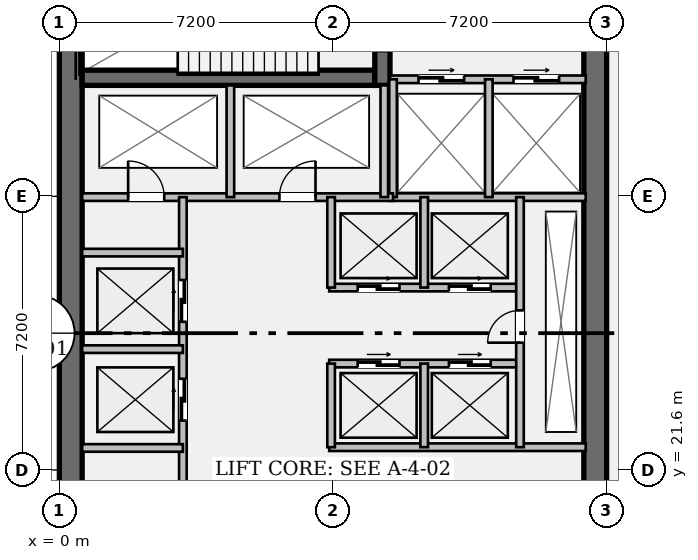
"""IFC4 building model, lengths in metres.
Left out: names, types, materials, properties, quantities, classifications, styles, units other than length and angle.
Written with IfcOpenShell. Run it as: python <this file> out.ifc"""

import sys

from ifc_helpers import new_model, si_unit, direction, frame, frame_2d, origin, place, context, subcontext, project, spatial, rectangle, extrude, element, fill, save


model = new_model("IFC4")
c1 = context("Model", 3, precision=1e-05, world=origin(), true_north=direction((0.0, 1.0)))
c2 = subcontext(c1, "Body", "Model", "MODEL_VIEW")
j1 = project(units=[si_unit("LENGTHUNIT", "METRE"), si_unit("PLANEANGLEUNIT", "RADIAN")], contexts=[c1])
p1 = place(None, origin())
s1 = spatial("IfcSite", under=j1, at=p1, CompositionType="ELEMENT")
p2 = place(p1, origin())
s2 = spatial("IfcBuilding", under=s1, at=p2, CompositionType="ELEMENT")
p3 = place(p2, origin())
s3 = spatial("IfcBuildingStorey", under=s2, at=p3, CompositionType="ELEMENT", Elevation=0.0)
p4 = place(p3, frame((0.3, 7.2, 0.0), z_axis=(0.0, 0.0, 1.0), x_axis=(0.0, 1.0, 0.0)))
e1 = element("IfcWall", 1, at=p4, inside=s3, PredefinedType="SHEAR", context=c2, shape_type="SweptSolid", body=[
    extrude(rectangle(XDim=28.8, YDim=0.6, at=frame_2d((14.4, 0.0))), origin(), (0.0, 0.0, 1.0), 4.95),
])
p5 = place(p3, frame((14.1, 35.4, 0.0), z_axis=(0.0, 0.0, 1.0), x_axis=(0.0, -1.0, 0.0)))
e2 = element("IfcWall", 2, at=p5, inside=s3, PredefinedType="SHEAR", context=c2, shape_type="SweptSolid", body=[
    extrude(rectangle(XDim=27.6, YDim=0.6, at=frame_2d((13.8, 0.0))), origin(), (0.0, 0.0, 1.0), 4.95),
])
p6 = place(p5, frame((1.3, 0.0, 0.0)))
e3 = element("IfcOpeningElement", 3, at=p6, cuts=e2, PredefinedType="OPENING", context=c2, shape_type="SweptSolid", body=[
    extrude(rectangle(XDim=1.2, YDim=2.15, at=frame_2d((0.6, 1.075))), frame((0.0, 0.312, 0.0), z_axis=(0.0, -1.0, 0.0), x_axis=(1.0, 0.0, 0.0)), (0.0, 0.0, 1.0), 0.624),
])
p7 = place(p5, frame((25.25, 0.0, 0.0)))
e4 = element("IfcOpeningElement", 4, at=p7, cuts=e2, PredefinedType="OPENING", context=c2, shape_type="SweptSolid", body=[
    extrude(rectangle(XDim=1.2, YDim=2.15, at=frame_2d((0.6, 1.075))), frame((0.0, 0.312, 0.0), z_axis=(0.0, -1.0, 0.0), x_axis=(1.0, 0.0, 0.0)), (0.0, 0.0, 1.0), 0.624),
])
p8 = place(p5, frame((14.6, 0.0, 0.0)))
e5 = element("IfcOpeningElement", 5, at=p8, cuts=e2, PredefinedType="OPENING", context=c2, shape_type="SweptSolid", body=[
    extrude(rectangle(XDim=1.6, YDim=2.2, at=frame_2d((0.8, 1.1))), frame((0.0, 0.312, 0.0), z_axis=(0.0, -1.0, 0.0), x_axis=(1.0, 0.0, 0.0)), (0.0, 0.0, 1.0), 0.624),
])
p9 = place(p3, frame((0.6, 31.92, 0.0), z_axis=(0.0, 0.0, 1.0), x_axis=(1.0, 0.0, 0.0)))
e6 = element("IfcWall", 6, at=p9, inside=s3, PredefinedType="SHEAR", context=c2, shape_type="SweptSolid", body=[
    extrude(rectangle(XDim=7.7, YDim=0.4, at=frame_2d((3.85, 0.0))), origin(), (0.0, 0.0, 1.0), 4.95),
])
p10 = place(p3, frame((8.5, 31.72, 0.0), z_axis=(0.0, 0.0, 1.0), x_axis=(0.0, 1.0, 0.0)))
e7 = element("IfcWall", 7, at=p10, inside=s3, PredefinedType="SHEAR", context=c2, shape_type="SweptSolid", body=[
    extrude(rectangle(XDim=3.68, YDim=0.4, at=frame_2d((1.84, 0.0))), origin(), (0.0, 0.0, 1.0), 4.95),
])
p11 = place(p10, frame((0.9, 0.0, 0.0)))
e8 = element("IfcOpeningElement", 8, at=p11, cuts=e7, PredefinedType="OPENING", context=c2, shape_type="SweptSolid", body=[
    extrude(rectangle(XDim=1.1, YDim=2.15, at=frame_2d((0.55, 1.075))), frame((0.0, 0.212, 0.0), z_axis=(0.0, -1.0, 0.0), x_axis=(1.0, 0.0, 0.0)), (0.0, 0.0, 1.0), 0.424),
])
p12 = place(p3, frame((8.7, 31.88, 0.0), z_axis=(0.0, 0.0, 1.0), x_axis=(1.0, 0.0, 0.0)))
e9 = element("IfcWall", 9, at=p12, inside=s3, PredefinedType="PARTITIONING", context=c2, shape_type="SweptSolid", body=[
    extrude(rectangle(XDim=5.15, YDim=0.2, at=frame_2d((2.575, 0.0))), origin(), (0.0, 0.0, 1.0), 4.95),
])
p13 = place(p12, frame((0.75, 0.0, 0.0)))
e10 = element("IfcOpeningElement", 10, at=p13, cuts=e9, PredefinedType="OPENING", context=c2, shape_type="SweptSolid", body=[
    extrude(rectangle(XDim=1.2, YDim=2.2, at=frame_2d((0.6, 1.1))), frame((0.0, 0.112, 0.0), z_axis=(0.0, -1.0, 0.0), x_axis=(1.0, 0.0, 0.0)), (0.0, 0.0, 1.0), 0.224),
])
p14 = place(p12, frame((3.25, 0.0, 0.0)))
e11 = element("IfcOpeningElement", 11, at=p14, cuts=e9, PredefinedType="OPENING", context=c2, shape_type="SweptSolid", body=[
    extrude(rectangle(XDim=1.2, YDim=2.2, at=frame_2d((0.6, 1.1))), frame((0.0, 0.112, 0.0), z_axis=(0.0, -1.0, 0.0), x_axis=(1.0, 0.0, 0.0)), (0.0, 0.0, 1.0), 0.224),
])
p15 = place(p3, frame((8.7, 28.78, 0.0), z_axis=(0.0, 0.0, 1.0), x_axis=(1.0, 0.0, 0.0)))
e12 = element("IfcWall", 12, at=p15, inside=s3, PredefinedType="PARTITIONING", context=c2, shape_type="SweptSolid", body=[
    extrude(rectangle(XDim=5.15, YDim=0.2, at=frame_2d((2.575, 0.0))), origin(), (0.0, 0.0, 1.0), 4.95),
])
for number, where, z_axis, x_axis in (
    (13, (8.78, 28.78, 0.0), (0.0, 0.0, 1.0), (0.0, 1.0, 0.0)),
    (14, (11.3, 28.78, 0.0), (0.0, 0.0, 1.0), (0.0, 1.0, 0.0)),
):
    element("IfcWall", number, at=place(p3, frame(where, z_axis=z_axis, x_axis=x_axis)), inside=s3, PredefinedType="PARTITIONING", context=c2, shape_type="SweptSolid", body=[
        extrude(rectangle(XDim=3.1, YDim=0.2, at=frame_2d((1.55, 0.0))), origin(), (0.0, 0.0, 1.0), 4.95),
    ])
p16 = place(p3, frame((0.6, 28.78, 0.0), z_axis=(0.0, 0.0, 1.0), x_axis=(1.0, 0.0, 0.0)))
e15 = element("IfcWall", 15, at=p16, inside=s3, PredefinedType="PARTITIONING", context=c2, shape_type="SweptSolid", body=[
    extrude(rectangle(XDim=8.18, YDim=0.2, at=frame_2d((4.09, 0.0))), origin(), (0.0, 0.0, 1.0), 4.95),
])
p17 = place(p16, frame((1.21, 0.0, 0.0)))
e16 = element("IfcOpeningElement", 16, at=p17, cuts=e15, PredefinedType="OPENING", context=c2, shape_type="SweptSolid", body=[
    extrude(rectangle(XDim=0.95, YDim=2.15, at=frame_2d((0.475, 1.075))), frame((0.0, 0.112, 0.0), z_axis=(0.0, -1.0, 0.0), x_axis=(1.0, 0.0, 0.0)), (0.0, 0.0, 1.0), 0.224),
])
p18 = place(p16, frame((5.19, 0.0, 0.0)))
e17 = element("IfcOpeningElement", 17, at=p18, cuts=e15, PredefinedType="OPENING", context=c2, shape_type="SweptSolid", body=[
    extrude(rectangle(XDim=0.95, YDim=2.15, at=frame_2d((0.475, 1.075))), frame((0.0, 0.112, 0.0), z_axis=(0.0, -1.0, 0.0), x_axis=(1.0, 0.0, 0.0)), (0.0, 0.0, 1.0), 0.224),
])
for number, where, z_axis, x_axis in (
    (18, (4.5, 28.78, 0.0), (0.0, 0.0, 1.0), (0.0, 1.0, 0.0)),
    (19, (8.55, 28.78, 0.0), (0.0, 0.0, 1.0), (0.0, 1.0, 0.0)),
):
    element("IfcWall", number, at=place(p3, frame(where, z_axis=z_axis, x_axis=x_axis)), inside=s3, PredefinedType="PARTITIONING", context=c2, shape_type="SweptSolid", body=[
        extrude(rectangle(XDim=2.94, YDim=0.2, at=frame_2d((1.47, 0.0))), origin(), (0.0, 0.0, 1.0), 4.95),
    ])
p19 = place(p3, frame((3.25, 15.7, 0.0), z_axis=(0.0, 0.0, 1.0), x_axis=(0.0, 1.0, 0.0)))
e20 = element("IfcWall", 20, at=p19, inside=s3, PredefinedType="PARTITIONING", context=c2, shape_type="SweptSolid", body=[
    extrude(rectangle(XDim=13.08, YDim=0.2, at=frame_2d((6.54, 0.0))), origin(), (0.0, 0.0, 1.0), 4.95),
])
p20 = place(p19, frame((0.9, 0.0, 0.0)))
e21 = element("IfcOpeningElement", 21, at=p20, cuts=e20, PredefinedType="OPENING", context=c2, shape_type="SweptSolid", body=[
    extrude(rectangle(XDim=1.1, YDim=2.2, at=frame_2d((0.55, 1.1))), frame((0.0, 0.112, 0.0), z_axis=(0.0, -1.0, 0.0), x_axis=(1.0, 0.0, 0.0)), (0.0, 0.0, 1.0), 0.224),
])
p21 = place(p19, frame((3.5, 0.0, 0.0)))
e22 = element("IfcOpeningElement", 22, at=p21, cuts=e20, PredefinedType="OPENING", context=c2, shape_type="SweptSolid", body=[
    extrude(rectangle(XDim=1.1, YDim=2.2, at=frame_2d((0.55, 1.1))), frame((0.0, 0.112, 0.0), z_axis=(0.0, -1.0, 0.0), x_axis=(1.0, 0.0, 0.0)), (0.0, 0.0, 1.0), 0.224),
])
p22 = place(p19, frame((7.2, 0.0, 0.0)))
e23 = element("IfcOpeningElement", 23, at=p22, cuts=e20, PredefinedType="OPENING", context=c2, shape_type="SweptSolid", body=[
    extrude(rectangle(XDim=1.1, YDim=2.2, at=frame_2d((0.55, 1.1))), frame((0.0, 0.112, 0.0), z_axis=(0.0, -1.0, 0.0), x_axis=(1.0, 0.0, 0.0)), (0.0, 0.0, 1.0), 0.224),
])
p23 = place(p19, frame((9.8, 0.0, 0.0)))
e24 = element("IfcOpeningElement", 24, at=p23, cuts=e20, PredefinedType="OPENING", context=c2, shape_type="SweptSolid", body=[
    extrude(rectangle(XDim=1.1, YDim=2.2, at=frame_2d((0.55, 1.1))), frame((0.0, 0.112, 0.0), z_axis=(0.0, -1.0, 0.0), x_axis=(1.0, 0.0, 0.0)), (0.0, 0.0, 1.0), 0.224),
])
for number, where, z_axis, x_axis in (
    (25, (0.6, 22.18, 0.0), (0.0, 0.0, 1.0), (1.0, 0.0, 0.0)),
    (26, (0.6, 24.78, 0.0), (0.0, 0.0, 1.0), (1.0, 0.0, 0.0)),
    (27, (0.6, 27.32, 0.0), (0.0, 0.0, 1.0), (1.0, 0.0, 0.0)),
):
    element("IfcWall", number, at=place(p3, frame(where, z_axis=z_axis, x_axis=x_axis)), inside=s3, PredefinedType="PARTITIONING", context=c2, shape_type="SweptSolid", body=[
        extrude(rectangle(XDim=2.65, YDim=0.2, at=frame_2d((1.325, 0.0))), origin(), (0.0, 0.0, 1.0), 4.95),
    ])
p24 = place(p3, frame((7.1, 22.2, 0.0), z_axis=(0.0, 0.0, 1.0), x_axis=(1.0, 0.0, 0.0)))
e28 = element("IfcWall", 28, at=p24, inside=s3, PredefinedType="PARTITIONING", context=c2, shape_type="SweptSolid", body=[
    extrude(rectangle(XDim=6.75, YDim=0.2, at=frame_2d((3.375, 0.0))), origin(), (0.0, 0.0, 1.0), 4.95),
])
p25 = place(p3, frame((7.1, 24.4, 0.0), z_axis=(0.0, 0.0, 1.0), x_axis=(1.0, 0.0, 0.0)))
e29 = element("IfcWall", 29, at=p25, inside=s3, PredefinedType="PARTITIONING", context=c2, shape_type="SweptSolid", body=[
    extrude(rectangle(XDim=5.02, YDim=0.2, at=frame_2d((2.51, 0.0))), origin(), (0.0, 0.0, 1.0), 4.95),
])
p26 = place(p25, frame((0.75, 0.0, 0.0)))
e30 = element("IfcOpeningElement", 30, at=p26, cuts=e29, PredefinedType="OPENING", context=c2, shape_type="SweptSolid", body=[
    extrude(rectangle(XDim=1.1, YDim=2.2, at=frame_2d((0.55, 1.1))), frame((0.0, 0.112, 0.0), z_axis=(0.0, -1.0, 0.0), x_axis=(1.0, 0.0, 0.0)), (0.0, 0.0, 1.0), 0.224),
])
p27 = place(p25, frame((3.15, 0.0, 0.0)))
e31 = element("IfcOpeningElement", 31, at=p27, cuts=e29, PredefinedType="OPENING", context=c2, shape_type="SweptSolid", body=[
    extrude(rectangle(XDim=1.1, YDim=2.2, at=frame_2d((0.55, 1.1))), frame((0.0, 0.112, 0.0), z_axis=(0.0, -1.0, 0.0), x_axis=(1.0, 0.0, 0.0)), (0.0, 0.0, 1.0), 0.224),
])
p28 = place(p3, frame((7.1, 26.4, 0.0), z_axis=(0.0, 0.0, 1.0), x_axis=(1.0, 0.0, 0.0)))
e32 = element("IfcWall", 32, at=p28, inside=s3, PredefinedType="PARTITIONING", context=c2, shape_type="SweptSolid", body=[
    extrude(rectangle(XDim=5.02, YDim=0.2, at=frame_2d((2.51, 0.0))), origin(), (0.0, 0.0, 1.0), 4.95),
])
p29 = place(p28, frame((0.75, 0.0, 0.0)))
e33 = element("IfcOpeningElement", 33, at=p29, cuts=e32, PredefinedType="OPENING", context=c2, shape_type="SweptSolid", body=[
    extrude(rectangle(XDim=1.1, YDim=2.2, at=frame_2d((0.55, 1.1))), frame((0.0, 0.112, 0.0), z_axis=(0.0, -1.0, 0.0), x_axis=(1.0, 0.0, 0.0)), (0.0, 0.0, 1.0), 0.224),
])
p30 = place(p28, frame((3.15, 0.0, 0.0)))
e34 = element("IfcOpeningElement", 34, at=p30, cuts=e32, PredefinedType="OPENING", context=c2, shape_type="SweptSolid", body=[
    extrude(rectangle(XDim=1.1, YDim=2.2, at=frame_2d((0.55, 1.1))), frame((0.0, 0.112, 0.0), z_axis=(0.0, -1.0, 0.0), x_axis=(1.0, 0.0, 0.0)), (0.0, 0.0, 1.0), 0.224),
])
p31 = place(p3, frame((7.15, 22.2, 0.0), z_axis=(0.0, 0.0, 1.0), x_axis=(0.0, 1.0, 0.0)))
e35 = element("IfcWall", 35, at=p31, inside=s3, PredefinedType="PARTITIONING", context=c2, shape_type="SweptSolid", body=[
    extrude(rectangle(XDim=2.2, YDim=0.2, at=frame_2d((1.1, 0.0))), origin(), (0.0, 0.0, 1.0), 4.95),
])
p32 = place(p3, frame((7.15, 26.4, 0.0), z_axis=(0.0, 0.0, 1.0), x_axis=(0.0, 1.0, 0.0)))
e36 = element("IfcWall", 36, at=p32, inside=s3, PredefinedType="PARTITIONING", context=c2, shape_type="SweptSolid", body=[
    extrude(rectangle(XDim=2.38, YDim=0.2, at=frame_2d((1.19, 0.0))), origin(), (0.0, 0.0, 1.0), 4.95),
])
p33 = place(p3, frame((9.6, 22.2, 0.0), z_axis=(0.0, 0.0, 1.0), x_axis=(0.0, 1.0, 0.0)))
e37 = element("IfcWall", 37, at=p33, inside=s3, PredefinedType="PARTITIONING", context=c2, shape_type="SweptSolid", body=[
    extrude(rectangle(XDim=2.2, YDim=0.2, at=frame_2d((1.1, 0.0))), origin(), (0.0, 0.0, 1.0), 4.95),
])
p34 = place(p3, frame((9.6, 26.4, 0.0), z_axis=(0.0, 0.0, 1.0), x_axis=(0.0, 1.0, 0.0)))
e38 = element("IfcWall", 38, at=p34, inside=s3, PredefinedType="PARTITIONING", context=c2, shape_type="SweptSolid", body=[
    extrude(rectangle(XDim=2.38, YDim=0.2, at=frame_2d((1.19, 0.0))), origin(), (0.0, 0.0, 1.0), 4.95),
])
p35 = place(p3, frame((12.12, 22.2, 0.0), z_axis=(0.0, 0.0, 1.0), x_axis=(0.0, 1.0, 0.0)))
e39 = element("IfcWall", 39, at=p35, inside=s3, PredefinedType="PARTITIONING", context=c2, shape_type="SweptSolid", body=[
    extrude(rectangle(XDim=6.58, YDim=0.2, at=frame_2d((3.29, 0.0))), origin(), (0.0, 0.0, 1.0), 4.95),
])
p36 = place(p35, frame((2.75, 0.0, 0.0)))
e40 = element("IfcOpeningElement", 40, at=p36, cuts=e39, PredefinedType="OPENING", context=c2, shape_type="SweptSolid", body=[
    extrude(rectangle(XDim=0.85, YDim=2.15, at=frame_2d((0.425, 1.075))), frame((0.0, 0.112, 0.0), z_axis=(0.0, -1.0, 0.0), x_axis=(1.0, 0.0, 0.0)), (0.0, 0.0, 1.0), 0.224),
])
p37 = place(p13, origin())
e41 = element("IfcDoor", 41, at=p37, inside=s3, OperationType="DOUBLE_DOOR_SLIDING", PredefinedType="DOOR", context=c2, shape_type="SweptSolid", body=[
    extrude(rectangle(XDim=1.2, YDim=2.2, at=frame_2d((0.6, 1.1))), frame((0.0, 0.025, 0.0), z_axis=(0.0, -1.0, 0.0), x_axis=(1.0, 0.0, 0.0)), (0.0, 0.0, 1.0), 0.05),
])
fill(e10, e41)
p38 = place(p14, origin())
e42 = element("IfcDoor", 42, at=p38, inside=s3, OperationType="DOUBLE_DOOR_SLIDING", PredefinedType="DOOR", context=c2, shape_type="SweptSolid", body=[
    extrude(rectangle(XDim=1.2, YDim=2.2, at=frame_2d((0.6, 1.1))), frame((0.0, 0.025, 0.0), z_axis=(0.0, -1.0, 0.0), x_axis=(1.0, 0.0, 0.0)), (0.0, 0.0, 1.0), 0.05),
])
fill(e11, e42)
p39 = place(p17, origin())
e43 = element("IfcDoor", 43, at=p39, inside=s3, OperationType="SINGLE_SWING_LEFT", PredefinedType="DOOR", context=c2, shape_type="SweptSolid", body=[
    extrude(rectangle(XDim=0.95, YDim=2.15, at=frame_2d((0.475, 1.075))), frame((0.0, 0.025, 0.0), z_axis=(0.0, -1.0, 0.0), x_axis=(1.0, 0.0, 0.0)), (0.0, 0.0, 1.0), 0.05),
])
fill(e16, e43)
p40 = place(p18, origin())
e44 = element("IfcDoor", 44, at=p40, inside=s3, OperationType="SINGLE_SWING_RIGHT", PredefinedType="DOOR", context=c2, shape_type="SweptSolid", body=[
    extrude(rectangle(XDim=0.95, YDim=2.15, at=frame_2d((0.475, 1.075))), frame((0.0, 0.025, 0.0), z_axis=(0.0, -1.0, 0.0), x_axis=(1.0, 0.0, 0.0)), (0.0, 0.0, 1.0), 0.05),
])
fill(e17, e44)
p41 = place(p22, origin())
e45 = element("IfcDoor", 45, at=p41, inside=s3, OperationType="DOUBLE_DOOR_SLIDING", PredefinedType="DOOR", context=c2, shape_type="SweptSolid", body=[
    extrude(rectangle(XDim=1.1, YDim=2.2, at=frame_2d((0.55, 1.1))), frame((0.0, 0.025, 0.0), z_axis=(0.0, -1.0, 0.0), x_axis=(1.0, 0.0, 0.0)), (0.0, 0.0, 1.0), 0.05),
])
fill(e23, e45)
p42 = place(p23, origin())
e46 = element("IfcDoor", 46, at=p42, inside=s3, OperationType="DOUBLE_DOOR_SLIDING", PredefinedType="DOOR", context=c2, shape_type="SweptSolid", body=[
    extrude(rectangle(XDim=1.1, YDim=2.2, at=frame_2d((0.55, 1.1))), frame((0.0, 0.025, 0.0), z_axis=(0.0, -1.0, 0.0), x_axis=(1.0, 0.0, 0.0)), (0.0, 0.0, 1.0), 0.05),
])
fill(e24, e46)
p43 = place(p36, origin())
e47 = element("IfcDoor", 47, at=p43, inside=s3, OperationType="SINGLE_SWING_LEFT", PredefinedType="DOOR", context=c2, shape_type="SweptSolid", body=[
    extrude(rectangle(XDim=0.85, YDim=2.15, at=frame_2d((0.425, 1.075))), frame((0.0, 0.025, 0.0), z_axis=(0.0, -1.0, 0.0), x_axis=(1.0, 0.0, 0.0)), (0.0, 0.0, 1.0), 0.05),
])
fill(e40, e47)
p44 = place(p26, origin())
e48 = element("IfcDoor", 48, at=p44, inside=s3, OperationType="DOUBLE_DOOR_SLIDING", PredefinedType="DOOR", context=c2, shape_type="SweptSolid", body=[
    extrude(rectangle(XDim=1.1, YDim=2.2, at=frame_2d((0.55, 1.1))), frame((0.0, 0.025, 0.0), z_axis=(0.0, -1.0, 0.0), x_axis=(1.0, 0.0, 0.0)), (0.0, 0.0, 1.0), 0.05),
])
fill(e30, e48)
p45 = place(p27, origin())
e49 = element("IfcDoor", 49, at=p45, inside=s3, OperationType="DOUBLE_DOOR_SLIDING", PredefinedType="DOOR", context=c2, shape_type="SweptSolid", body=[
    extrude(rectangle(XDim=1.1, YDim=2.2, at=frame_2d((0.55, 1.1))), frame((0.0, 0.025, 0.0), z_axis=(0.0, -1.0, 0.0), x_axis=(1.0, 0.0, 0.0)), (0.0, 0.0, 1.0), 0.05),
])
fill(e31, e49)
p46 = place(p29, origin())
e50 = element("IfcDoor", 50, at=p46, inside=s3, OperationType="DOUBLE_DOOR_SLIDING", PredefinedType="DOOR", context=c2, shape_type="SweptSolid", body=[
    extrude(rectangle(XDim=1.1, YDim=2.2, at=frame_2d((0.55, 1.1))), frame((0.0, 0.025, 0.0), z_axis=(0.0, -1.0, 0.0), x_axis=(1.0, 0.0, 0.0)), (0.0, 0.0, 1.0), 0.05),
])
fill(e33, e50)
p47 = place(p30, origin())
e51 = element("IfcDoor", 51, at=p47, inside=s3, OperationType="DOUBLE_DOOR_SLIDING", PredefinedType="DOOR", context=c2, shape_type="SweptSolid", body=[
    extrude(rectangle(XDim=1.1, YDim=2.2, at=frame_2d((0.55, 1.1))), frame((0.0, 0.025, 0.0), z_axis=(0.0, -1.0, 0.0), x_axis=(1.0, 0.0, 0.0)), (0.0, 0.0, 1.0), 0.05),
])
fill(e34, e51)
save(model, sys.argv[1])
